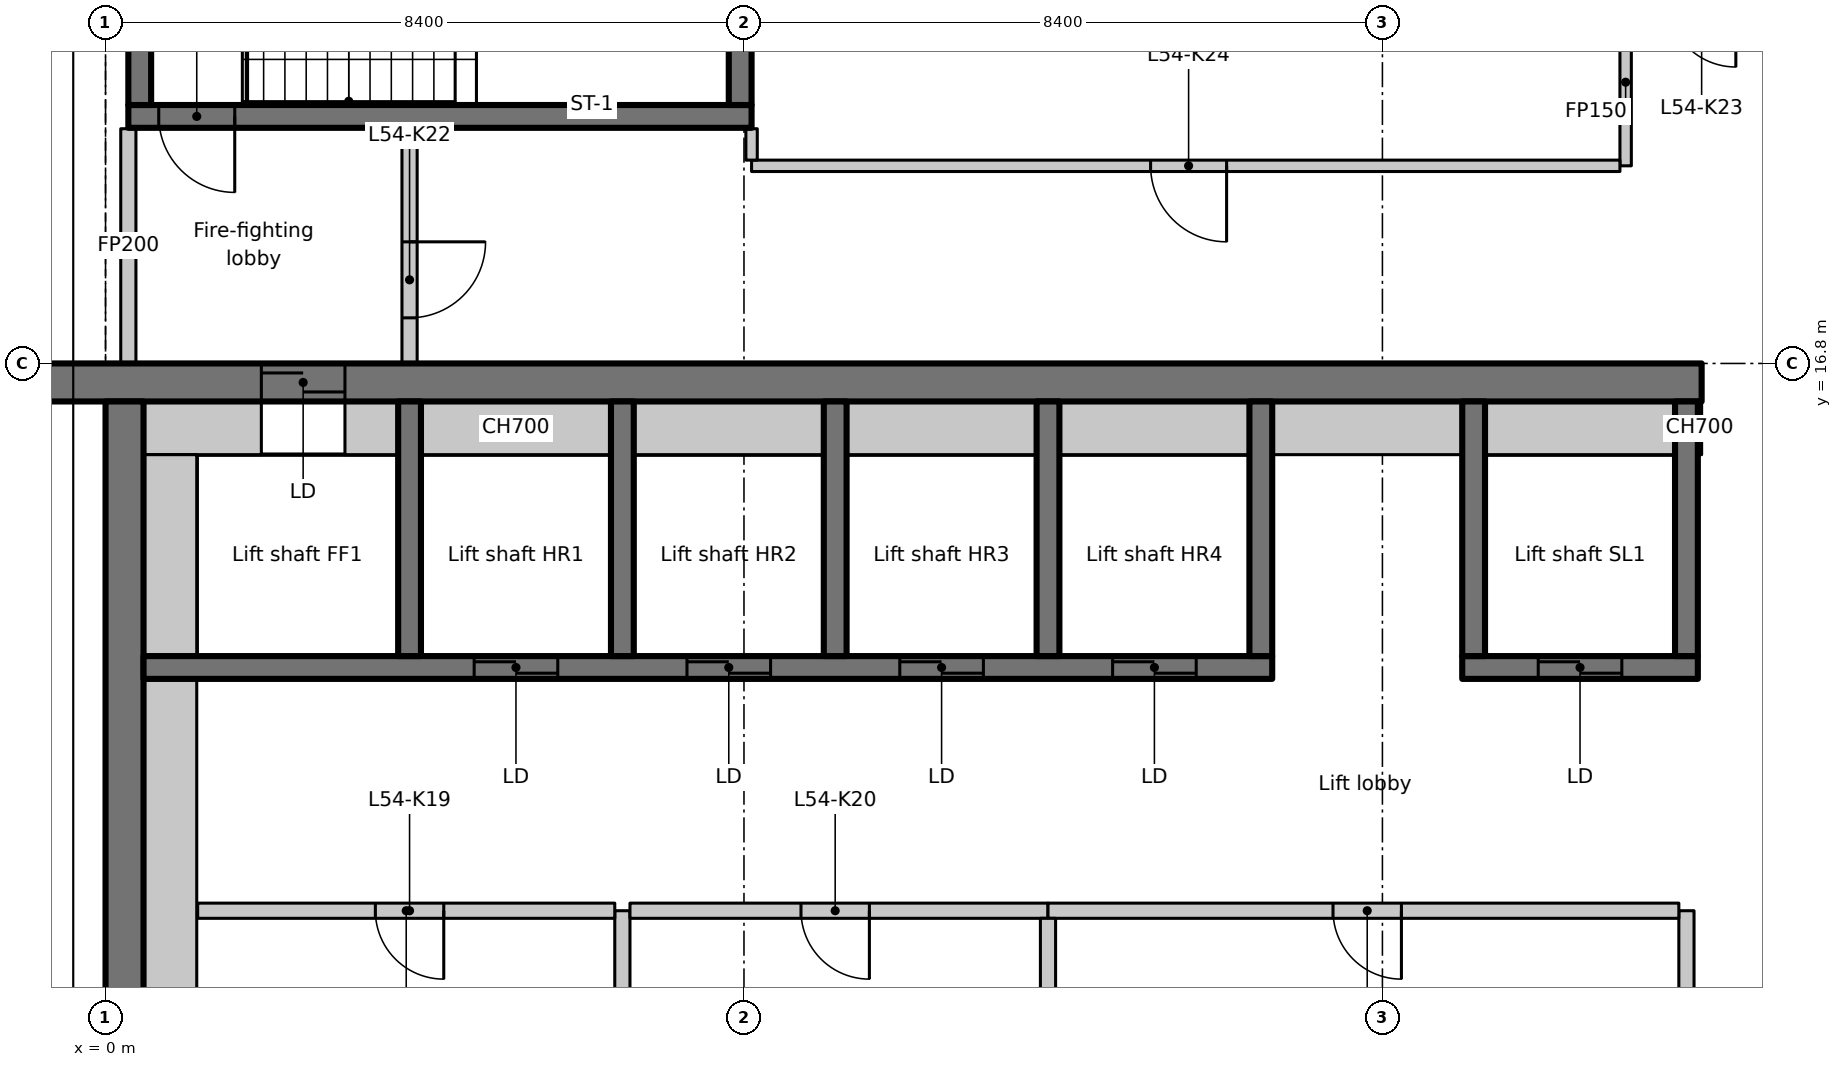
"""IFC4 building model, lengths in metres.
Left out: names, types, materials, properties, quantities, classifications, styles, units other than length and angle.
Written with IfcOpenShell. Run it as: python <this file> out.ifc"""

import sys

from ifc_helpers import new_model, si_unit, direction, frame, frame_2d, origin, place, context, subcontext, project, spatial, rectangle, extrude, element, fill, save


model = new_model("IFC4")
c1 = context("Model", 3, precision=1e-05, world=origin(), true_north=direction((0.0, 1.0)))
c2 = subcontext(c1, "Body", "Model", "MODEL_VIEW")
j1 = project(units=[si_unit("LENGTHUNIT", "METRE"), si_unit("PLANEANGLEUNIT", "RADIAN")], contexts=[c1])
p1 = place(None, origin())
s1 = spatial("IfcSite", under=j1, at=p1, CompositionType="ELEMENT")
p2 = place(p1, origin())
s2 = spatial("IfcBuilding", under=s1, at=p2, CompositionType="ELEMENT")
p3 = place(p2, frame((0.0, 0.0, 215.7)))
s3 = spatial("IfcBuildingStorey", under=s2, at=p3, CompositionType="ELEMENT", Elevation=215.7)
p4 = place(p3, frame((-1.1, 16.55, 0.0), z_axis=(0.0, 0.0, 1.0), x_axis=(1.0, 0.0, 0.0)))
e1 = element("IfcWall", 1, at=p4, inside=s3, PredefinedType="SHEAR", context=c2, shape_type="SweptSolid", body=[
    extrude(rectangle(XDim=22.1, YDim=0.5, at=frame_2d((11.05, 0.0))), origin(), (0.0, 0.0, 1.0), 3.35),
])
p5 = place(p4, frame((3.15, 0.0, 0.0)))
e2 = element("IfcOpeningElement", 2, at=p5, cuts=e1, PredefinedType="OPENING", context=c2, shape_type="SweptSolid", body=[
    extrude(rectangle(XDim=1.1, YDim=2.3, at=frame_2d((0.55, 1.15))), frame((0.0, 0.26, 0.0), z_axis=(0.0, -1.0, 0.0), x_axis=(1.0, 0.0, 0.0)), (0.0, 0.0, 1.0), 0.52),
])
p6 = place(p3, frame((0.25, 7.436, 0.0), z_axis=(0.0, 0.0, 1.0), x_axis=(0.0, 1.0, 0.0)))
e3 = element("IfcWall", 3, at=p6, inside=s3, PredefinedType="SHEAR", context=c2, shape_type="SweptSolid", body=[
    extrude(rectangle(XDim=8.864, YDim=0.5, at=frame_2d((4.432, 0.0))), origin(), (0.0, 0.0, 1.0), 3.35),
])
p7 = place(p3, frame((0.5, 15.95, 0.0), z_axis=(0.0, 0.0, 1.0), x_axis=(1.0, 0.0, 0.0)))
e4 = element("IfcWall", 4, at=p7, inside=s3, PredefinedType="PARTITIONING", context=c2, shape_type="SweptSolid", body=[
    extrude(rectangle(XDim=1.55, YDim=0.7, at=frame_2d((0.775, 0.0))), origin(), (0.0, 0.0, 1.0), 3.35),
])
p8 = place(p3, frame((0.5, 12.8, 0.0), z_axis=(0.0, 0.0, 1.0), x_axis=(1.0, 0.0, 0.0)))
e5 = element("IfcWall", 5, at=p8, inside=s3, PredefinedType="SHEAR", context=c2, shape_type="SweptSolid", body=[
    extrude(rectangle(XDim=14.85, YDim=0.3, at=frame_2d((7.425, 0.0))), origin(), (0.0, 0.0, 1.0), 3.35),
])
p9 = place(p8, frame((4.35, 0.0, 0.0)))
e6 = element("IfcOpeningElement", 6, at=p9, cuts=e5, PredefinedType="OPENING", context=c2, shape_type="SweptSolid", body=[
    extrude(rectangle(XDim=1.1, YDim=2.3, at=frame_2d((0.55, 1.15))), frame((0.0, 0.16, 0.0), z_axis=(0.0, -1.0, 0.0), x_axis=(1.0, 0.0, 0.0)), (0.0, 0.0, 1.0), 0.32),
])
p10 = place(p8, frame((7.15, 0.0, 0.0)))
e7 = element("IfcOpeningElement", 7, at=p10, cuts=e5, PredefinedType="OPENING", context=c2, shape_type="SweptSolid", body=[
    extrude(rectangle(XDim=1.1, YDim=2.3, at=frame_2d((0.55, 1.15))), frame((0.0, 0.16, 0.0), z_axis=(0.0, -1.0, 0.0), x_axis=(1.0, 0.0, 0.0)), (0.0, 0.0, 1.0), 0.32),
])
p11 = place(p8, frame((9.95, 0.0, 0.0)))
e8 = element("IfcOpeningElement", 8, at=p11, cuts=e5, PredefinedType="OPENING", context=c2, shape_type="SweptSolid", body=[
    extrude(rectangle(XDim=1.1, YDim=2.3, at=frame_2d((0.55, 1.15))), frame((0.0, 0.16, 0.0), z_axis=(0.0, -1.0, 0.0), x_axis=(1.0, 0.0, 0.0)), (0.0, 0.0, 1.0), 0.32),
])
p12 = place(p8, frame((12.75, 0.0, 0.0)))
e9 = element("IfcOpeningElement", 9, at=p12, cuts=e5, PredefinedType="OPENING", context=c2, shape_type="SweptSolid", body=[
    extrude(rectangle(XDim=1.1, YDim=2.3, at=frame_2d((0.55, 1.15))), frame((0.0, 0.16, 0.0), z_axis=(0.0, -1.0, 0.0), x_axis=(1.0, 0.0, 0.0)), (0.0, 0.0, 1.0), 0.32),
])
for number, where, z_axis, x_axis in (
    (10, (4.0, 12.95, 0.0), (0.0, 0.0, 1.0), (0.0, 1.0, 0.0)),
    (11, (6.8, 12.95, 0.0), (0.0, 0.0, 1.0), (0.0, 1.0, 0.0)),
    (12, (9.6, 12.95, 0.0), (0.0, 0.0, 1.0), (0.0, 1.0, 0.0)),
    (13, (12.4, 12.95, 0.0), (0.0, 0.0, 1.0), (0.0, 1.0, 0.0)),
    (14, (15.2, 12.95, 0.0), (0.0, 0.0, 1.0), (0.0, 1.0, 0.0)),
):
    element("IfcWall", number, at=place(p3, frame(where, z_axis=z_axis, x_axis=x_axis)), inside=s3, PredefinedType="SHEAR", context=c2, shape_type="SweptSolid", body=[
        extrude(rectangle(XDim=3.35, YDim=0.3, at=frame_2d((1.675, 0.0))), origin(), (0.0, 0.0, 1.0), 3.35),
    ])
p13 = place(p3, frame((17.85, 12.8, 0.0), z_axis=(0.0, 0.0, 1.0), x_axis=(1.0, 0.0, 0.0)))
e15 = element("IfcWall", 15, at=p13, inside=s3, PredefinedType="SHEAR", context=c2, shape_type="SweptSolid", body=[
    extrude(rectangle(XDim=3.1, YDim=0.3, at=frame_2d((1.55, 0.0))), origin(), (0.0, 0.0, 1.0), 3.35),
])
p14 = place(p13, frame((1.0, 0.0, 0.0)))
e16 = element("IfcOpeningElement", 16, at=p14, cuts=e15, PredefinedType="OPENING", context=c2, shape_type="SweptSolid", body=[
    extrude(rectangle(XDim=1.1, YDim=2.3, at=frame_2d((0.55, 1.15))), frame((0.0, 0.16, 0.0), z_axis=(0.0, -1.0, 0.0), x_axis=(1.0, 0.0, 0.0)), (0.0, 0.0, 1.0), 0.32),
])
for number, where, z_axis, x_axis in (
    (17, (18.0, 12.95, 0.0), (0.0, 0.0, 1.0), (0.0, 1.0, 0.0)),
    (18, (20.8, 12.95, 0.0), (0.0, 0.0, 1.0), (0.0, 1.0, 0.0)),
):
    element("IfcWall", number, at=place(p3, frame(where, z_axis=z_axis, x_axis=x_axis)), inside=s3, PredefinedType="SHEAR", context=c2, shape_type="SweptSolid", body=[
        extrude(rectangle(XDim=3.35, YDim=0.3, at=frame_2d((1.675, 0.0))), origin(), (0.0, 0.0, 1.0), 3.35),
    ])
p15 = place(p3, frame((8.5, 20.05, 0.0), z_axis=(0.0, 0.0, 1.0), x_axis=(-1.0, 0.0, 0.0)))
e19 = element("IfcWall", 19, at=p15, inside=s3, PredefinedType="SHEAR", context=c2, shape_type="SweptSolid", body=[
    extrude(rectangle(XDim=8.2, YDim=0.3, at=frame_2d((4.1, 0.0))), origin(), (0.0, 0.0, 1.0), 3.35),
])
p16 = place(p15, frame((6.8, 0.0, 0.0)))
e20 = element("IfcOpeningElement", 20, at=p16, cuts=e19, PredefinedType="OPENING", context=c2, shape_type="SweptSolid", body=[
    extrude(rectangle(XDim=1.0, YDim=2.1, at=frame_2d((0.5, 1.05))), frame((0.0, 0.16, 0.0), z_axis=(0.0, -1.0, 0.0), x_axis=(1.0, 0.0, 0.0)), (0.0, 0.0, 1.0), 0.32),
])
for number, where, z_axis, x_axis in (
    (21, (0.45, 20.2, 0.0), (0.0, 0.0, 1.0), (0.0, 1.0, 0.0)),
    (22, (8.35, 20.2, 0.0), (0.0, 0.0, 1.0), (0.0, 1.0, 0.0)),
):
    element("IfcWall", number, at=place(p3, frame(where, z_axis=z_axis, x_axis=x_axis)), inside=s3, PredefinedType="SHEAR", context=c2, shape_type="SweptSolid", body=[
        extrude(rectangle(XDim=2.55, YDim=0.3, at=frame_2d((1.275, 0.0))), origin(), (0.0, 0.0, 1.0), 3.35),
    ])
p17 = place(p3, frame((0.3, 16.812, 0.0), z_axis=(0.0, 0.0, 1.0), x_axis=(0.0, 1.0, 0.0)))
e23 = element("IfcWall", 23, at=p17, inside=s3, PredefinedType="PARTITIONING", context=c2, shape_type="SweptSolid", body=[
    extrude(rectangle(XDim=3.076, YDim=0.2, at=frame_2d((1.538, 0.0))), origin(), (0.0, 0.0, 1.0), 2.98),
])
p18 = place(p3, frame((4.0, 19.888, 0.0), z_axis=(0.0, 0.0, 1.0), x_axis=(0.0, -1.0, 0.0)))
e24 = element("IfcWall", 24, at=p18, inside=s3, PredefinedType="PARTITIONING", context=c2, shape_type="SweptSolid", body=[
    extrude(rectangle(XDim=3.076, YDim=0.2, at=frame_2d((1.538, 0.0))), origin(), (0.0, 0.0, 1.0), 3.35),
])
p19 = place(p18, frame((1.488, 0.0, 0.0)))
e25 = element("IfcOpeningElement", 25, at=p19, cuts=e24, PredefinedType="OPENING", context=c2, shape_type="SweptSolid", body=[
    extrude(rectangle(XDim=1.0, YDim=2.1, at=frame_2d((0.5, 1.05))), frame((0.0, 0.11, 0.0), z_axis=(0.0, -1.0, 0.0), x_axis=(1.0, 0.0, 0.0)), (0.0, 0.0, 1.0), 0.22),
])
p20 = place(p3, frame((6.8, 9.6, 0.0), z_axis=(0.0, 0.0, 1.0), x_axis=(0.0, -1.0, 0.0)))
e26 = element("IfcWall", 26, at=p20, inside=s3, PredefinedType="PARTITIONING", context=c2, shape_type="SweptSolid", body=[
    extrude(rectangle(XDim=2.5, YDim=0.2, at=frame_2d((1.25, 0.0))), origin(), (0.0, 0.0, 1.0), 3.35),
])
p21 = place(p3, frame((6.7, 9.6, 0.0), z_axis=(0.0, 0.0, 1.0), x_axis=(-1.0, 0.0, 0.0)))
e27 = element("IfcWall", 27, at=p21, inside=s3, PredefinedType="PARTITIONING", context=c2, shape_type="SweptSolid", body=[
    extrude(rectangle(XDim=5.488, YDim=0.2, at=frame_2d((2.744, 0.0))), origin(), (0.0, 0.0, 1.0), 3.35),
])
p22 = place(p21, frame((2.25, 0.0, 0.0)))
e28 = element("IfcOpeningElement", 28, at=p22, cuts=e27, PredefinedType="OPENING", context=c2, shape_type="SweptSolid", body=[
    extrude(rectangle(XDim=0.9, YDim=2.1, at=frame_2d((0.45, 1.05))), frame((0.0, 0.11, 0.0), z_axis=(0.0, -1.0, 0.0), x_axis=(1.0, 0.0, 0.0)), (0.0, 0.0, 1.0), 0.22),
])
p23 = place(p3, frame((12.4, 9.6, 0.0), z_axis=(0.0, 0.0, 1.0), x_axis=(-1.0, 0.0, 0.0)))
e29 = element("IfcWall", 29, at=p23, inside=s3, PredefinedType="PARTITIONING", context=c2, shape_type="SweptSolid", body=[
    extrude(rectangle(XDim=5.5, YDim=0.2, at=frame_2d((2.75, 0.0))), origin(), (0.0, 0.0, 1.0), 3.35),
])
p24 = place(p23, frame((2.35, 0.0, 0.0)))
e30 = element("IfcOpeningElement", 30, at=p24, cuts=e29, PredefinedType="OPENING", context=c2, shape_type="SweptSolid", body=[
    extrude(rectangle(XDim=0.9, YDim=2.1, at=frame_2d((0.45, 1.05))), frame((0.0, 0.11, 0.0), z_axis=(0.0, -1.0, 0.0), x_axis=(1.0, 0.0, 0.0)), (0.0, 0.0, 1.0), 0.22),
])
p25 = place(p3, frame((20.8, 7.1, 0.0), z_axis=(0.0, 0.0, 1.0), x_axis=(0.0, 1.0, 0.0)))
e31 = element("IfcWall", 31, at=p25, inside=s3, PredefinedType="PARTITIONING", context=c2, shape_type="SweptSolid", body=[
    extrude(rectangle(XDim=2.5, YDim=0.2, at=frame_2d((1.25, 0.0))), origin(), (0.0, 0.0, 1.0), 3.35),
])
p26 = place(p3, frame((20.7, 9.6, 0.0), z_axis=(0.0, 0.0, 1.0), x_axis=(-1.0, 0.0, 0.0)))
e32 = element("IfcWall", 32, at=p26, inside=s3, PredefinedType="PARTITIONING", context=c2, shape_type="SweptSolid", body=[
    extrude(rectangle(XDim=8.3, YDim=0.2, at=frame_2d((4.15, 0.0))), origin(), (0.0, 0.0, 1.0), 3.35),
])
p27 = place(p26, frame((3.65, 0.0, 0.0)))
e33 = element("IfcOpeningElement", 33, at=p27, cuts=e32, PredefinedType="OPENING", context=c2, shape_type="SweptSolid", body=[
    extrude(rectangle(XDim=0.9, YDim=2.1, at=frame_2d((0.45, 1.05))), frame((0.0, 0.11, 0.0), z_axis=(0.0, -1.0, 0.0), x_axis=(1.0, 0.0, 0.0)), (0.0, 0.0, 1.0), 0.22),
])
p28 = place(p3, frame((12.4, 9.5, 0.0), z_axis=(0.0, 0.0, 1.0), x_axis=(0.0, -1.0, 0.0)))
e34 = element("IfcWall", 34, at=p28, inside=s3, PredefinedType="PARTITIONING", context=c2, shape_type="SweptSolid", body=[
    extrude(rectangle(XDim=2.4, YDim=0.2, at=frame_2d((1.2, 0.0))), origin(), (0.0, 0.0, 1.0), 3.35),
])
p29 = place(p3, frame((20.0, 21.6, 0.0), z_axis=(0.0, 0.0, 1.0), x_axis=(0.0, -1.0, 0.0)))
e35 = element("IfcWall", 35, at=p29, inside=s3, PredefinedType="PARTITIONING", context=c2, shape_type="SweptSolid", body=[
    extrude(rectangle(XDim=2.2, YDim=0.15, at=frame_2d((1.1, 0.0))), origin(), (0.0, 0.0, 1.0), 3.35),
])
p30 = place(p3, frame((19.925, 19.4, 0.0), z_axis=(0.0, 0.0, 1.0), x_axis=(-1.0, 0.0, 0.0)))
e36 = element("IfcWall", 36, at=p30, inside=s3, PredefinedType="PARTITIONING", context=c2, shape_type="SweptSolid", body=[
    extrude(rectangle(XDim=11.425, YDim=0.15, at=frame_2d((5.712, 0.0))), origin(), (0.0, 0.0, 1.0), 3.35),
])
p31 = place(p30, frame((5.175, 0.0, 0.0)))
e37 = element("IfcOpeningElement", 37, at=p31, cuts=e36, PredefinedType="OPENING", context=c2, shape_type="SweptSolid", body=[
    extrude(rectangle(XDim=1.0, YDim=2.1, at=frame_2d((0.5, 1.05))), frame((0.0, 0.085, 0.0), z_axis=(0.0, -1.0, 0.0), x_axis=(1.0, 0.0, 0.0)), (0.0, 0.0, 1.0), 0.17),
])
p32 = place(p3, frame((8.5, 19.475, 0.0), z_axis=(0.0, 0.0, 1.0), x_axis=(0.0, 1.0, 0.0)))
e38 = element("IfcWall", 38, at=p32, inside=s3, PredefinedType="PARTITIONING", context=c2, shape_type="SweptSolid", body=[
    extrude(rectangle(XDim=0.413, YDim=0.15, at=frame_2d((0.207, 0.0))), origin(), (0.0, 0.0, 1.0), 3.35),
])
p33 = place(p3, frame((0.85, 7.436, 0.0), z_axis=(0.0, 0.0, 1.0), x_axis=(0.0, 1.0, 0.0)))
e39 = element("IfcWall", 39, at=p33, inside=s3, PredefinedType="PARTITIONING", context=c2, shape_type="SweptSolid", body=[
    extrude(rectangle(XDim=5.214, YDim=0.7, at=frame_2d((2.607, 0.0))), origin(), (0.0, 0.0, 1.0), 3.35),
])
p34 = place(p3, frame((0.85, 12.95, 0.0), z_axis=(0.0, 0.0, 1.0), x_axis=(0.0, 1.0, 0.0)))
e40 = element("IfcWall", 40, at=p34, inside=s3, PredefinedType="PARTITIONING", context=c2, shape_type="SweptSolid", body=[
    extrude(rectangle(XDim=2.65, YDim=0.7, at=frame_2d((1.325, 0.0))), origin(), (0.0, 0.0, 1.0), 3.35),
])
p35 = place(p3, frame((3.15, 15.95, 0.0), z_axis=(0.0, 0.0, 1.0), x_axis=(1.0, 0.0, 0.0)))
e41 = element("IfcWall", 41, at=p35, inside=s3, PredefinedType="PARTITIONING", context=c2, shape_type="SweptSolid", body=[
    extrude(rectangle(XDim=0.7, YDim=0.7, at=frame_2d((0.35, 0.0))), origin(), (0.0, 0.0, 1.0), 3.35),
])
for number, where, z_axis, x_axis in (
    (42, (4.15, 15.95, 0.0), (0.0, 0.0, 1.0), (1.0, 0.0, 0.0)),
    (43, (6.95, 15.95, 0.0), (0.0, 0.0, 1.0), (1.0, 0.0, 0.0)),
    (44, (9.75, 15.95, 0.0), (0.0, 0.0, 1.0), (1.0, 0.0, 0.0)),
    (45, (12.55, 15.95, 0.0), (0.0, 0.0, 1.0), (1.0, 0.0, 0.0)),
    (46, (15.35, 15.95, 0.0), (0.0, 0.0, 1.0), (1.0, 0.0, 0.0)),
    (47, (18.15, 15.95, 0.0), (0.0, 0.0, 1.0), (1.0, 0.0, 0.0)),
):
    element("IfcWall", number, at=place(p3, frame(where, z_axis=z_axis, x_axis=x_axis)), inside=s3, PredefinedType="PARTITIONING", context=c2, shape_type="SweptSolid", body=[
        extrude(rectangle(XDim=2.5, YDim=0.7, at=frame_2d((1.25, 0.0))), origin(), (0.0, 0.0, 1.0), 3.35),
    ])
p36 = place(p3, frame((20.95, 15.95, 0.0), z_axis=(0.0, 0.0, 1.0), x_axis=(1.0, 0.0, 0.0)))
e48 = element("IfcWall", 48, at=p36, inside=s3, PredefinedType="PARTITIONING", context=c2, shape_type="SweptSolid", body=[
    extrude(rectangle(XDim=0.05, YDim=0.7, at=frame_2d((0.025, 0.0))), origin(), (0.0, 0.0, 1.0), 3.35),
])
p37 = place(p5, origin())
e49 = element("IfcDoor", 49, at=p37, inside=s3, OperationType="SLIDING_TO_LEFT", PredefinedType="DOOR", context=c2, shape_type="SweptSolid", body=[
    extrude(rectangle(XDim=1.1, YDim=2.3, at=frame_2d((0.55, 1.15))), frame((0.0, 0.025, 0.0), z_axis=(0.0, -1.0, 0.0), x_axis=(1.0, 0.0, 0.0)), (0.0, 0.0, 1.0), 0.05),
])
fill(e2, e49)
p38 = place(p9, origin())
e50 = element("IfcDoor", 50, at=p38, inside=s3, OperationType="SLIDING_TO_LEFT", PredefinedType="DOOR", context=c2, shape_type="SweptSolid", body=[
    extrude(rectangle(XDim=1.1, YDim=2.3, at=frame_2d((0.55, 1.15))), frame((0.0, 0.025, 0.0), z_axis=(0.0, -1.0, 0.0), x_axis=(1.0, 0.0, 0.0)), (0.0, 0.0, 1.0), 0.05),
])
fill(e6, e50)
p39 = place(p10, origin())
e51 = element("IfcDoor", 51, at=p39, inside=s3, OperationType="SLIDING_TO_LEFT", PredefinedType="DOOR", context=c2, shape_type="SweptSolid", body=[
    extrude(rectangle(XDim=1.1, YDim=2.3, at=frame_2d((0.55, 1.15))), frame((0.0, 0.025, 0.0), z_axis=(0.0, -1.0, 0.0), x_axis=(1.0, 0.0, 0.0)), (0.0, 0.0, 1.0), 0.05),
])
fill(e7, e51)
p40 = place(p11, origin())
e52 = element("IfcDoor", 52, at=p40, inside=s3, OperationType="SLIDING_TO_LEFT", PredefinedType="DOOR", context=c2, shape_type="SweptSolid", body=[
    extrude(rectangle(XDim=1.1, YDim=2.3, at=frame_2d((0.55, 1.15))), frame((0.0, 0.025, 0.0), z_axis=(0.0, -1.0, 0.0), x_axis=(1.0, 0.0, 0.0)), (0.0, 0.0, 1.0), 0.05),
])
fill(e8, e52)
p41 = place(p12, origin())
e53 = element("IfcDoor", 53, at=p41, inside=s3, OperationType="SLIDING_TO_LEFT", PredefinedType="DOOR", context=c2, shape_type="SweptSolid", body=[
    extrude(rectangle(XDim=1.1, YDim=2.3, at=frame_2d((0.55, 1.15))), frame((0.0, 0.025, 0.0), z_axis=(0.0, -1.0, 0.0), x_axis=(1.0, 0.0, 0.0)), (0.0, 0.0, 1.0), 0.05),
])
fill(e9, e53)
p42 = place(p14, origin())
e54 = element("IfcDoor", 54, at=p42, inside=s3, OperationType="SLIDING_TO_LEFT", PredefinedType="DOOR", context=c2, shape_type="SweptSolid", body=[
    extrude(rectangle(XDim=1.1, YDim=2.3, at=frame_2d((0.55, 1.15))), frame((0.0, 0.025, 0.0), z_axis=(0.0, -1.0, 0.0), x_axis=(1.0, 0.0, 0.0)), (0.0, 0.0, 1.0), 0.05),
])
fill(e16, e54)
p43 = place(p16, origin())
e55 = element("IfcDoor", 55, at=p43, inside=s3, OperationType="SINGLE_SWING_LEFT", PredefinedType="DOOR", context=c2, shape_type="SweptSolid", body=[
    extrude(rectangle(XDim=1.0, YDim=2.1, at=frame_2d((0.5, 1.05))), frame((0.0, 0.025, 0.0), z_axis=(0.0, -1.0, 0.0), x_axis=(1.0, 0.0, 0.0)), (0.0, 0.0, 1.0), 0.05),
])
fill(e20, e55)
p44 = place(p22, origin())
e56 = element("IfcDoor", 56, at=p44, inside=s3, OperationType="SINGLE_SWING_RIGHT", PredefinedType="DOOR", context=c2, shape_type="SweptSolid", body=[
    extrude(rectangle(XDim=0.9, YDim=2.1, at=frame_2d((0.45, 1.05))), frame((0.0, 0.025, 0.0), z_axis=(0.0, -1.0, 0.0), x_axis=(1.0, 0.0, 0.0)), (0.0, 0.0, 1.0), 0.05),
])
fill(e28, e56)
p45 = place(p24, origin())
e57 = element("IfcDoor", 57, at=p45, inside=s3, OperationType="SINGLE_SWING_LEFT", PredefinedType="DOOR", context=c2, shape_type="SweptSolid", body=[
    extrude(rectangle(XDim=0.9, YDim=2.1, at=frame_2d((0.45, 1.05))), frame((0.0, 0.025, 0.0), z_axis=(0.0, -1.0, 0.0), x_axis=(1.0, 0.0, 0.0)), (0.0, 0.0, 1.0), 0.05),
])
fill(e30, e57)
p46 = place(p27, origin())
e58 = element("IfcDoor", 58, at=p46, inside=s3, OperationType="SINGLE_SWING_RIGHT", PredefinedType="DOOR", context=c2, shape_type="SweptSolid", body=[
    extrude(rectangle(XDim=0.9, YDim=2.1, at=frame_2d((0.45, 1.05))), frame((0.0, 0.025, 0.0), z_axis=(0.0, -1.0, 0.0), x_axis=(1.0, 0.0, 0.0)), (0.0, 0.0, 1.0), 0.05),
])
fill(e33, e58)
p47 = place(p19, origin())
e59 = element("IfcDoor", 59, at=p47, inside=s3, OperationType="SINGLE_SWING_LEFT", PredefinedType="DOOR", context=c2, shape_type="SweptSolid", body=[
    extrude(rectangle(XDim=1.0, YDim=2.1, at=frame_2d((0.5, 1.05))), frame((0.0, 0.025, 0.0), z_axis=(0.0, -1.0, 0.0), x_axis=(1.0, 0.0, 0.0)), (0.0, 0.0, 1.0), 0.05),
])
fill(e25, e59)
p48 = place(p31, origin())
e60 = element("IfcDoor", 60, at=p48, inside=s3, OperationType="SINGLE_SWING_LEFT", PredefinedType="DOOR", context=c2, shape_type="SweptSolid", body=[
    extrude(rectangle(XDim=1.0, YDim=2.1, at=frame_2d((0.5, 1.05))), frame((0.0, 0.025, 0.0), z_axis=(0.0, -1.0, 0.0), x_axis=(1.0, 0.0, 0.0)), (0.0, 0.0, 1.0), 0.05),
])
fill(e37, e60)
save(model, sys.argv[1])
